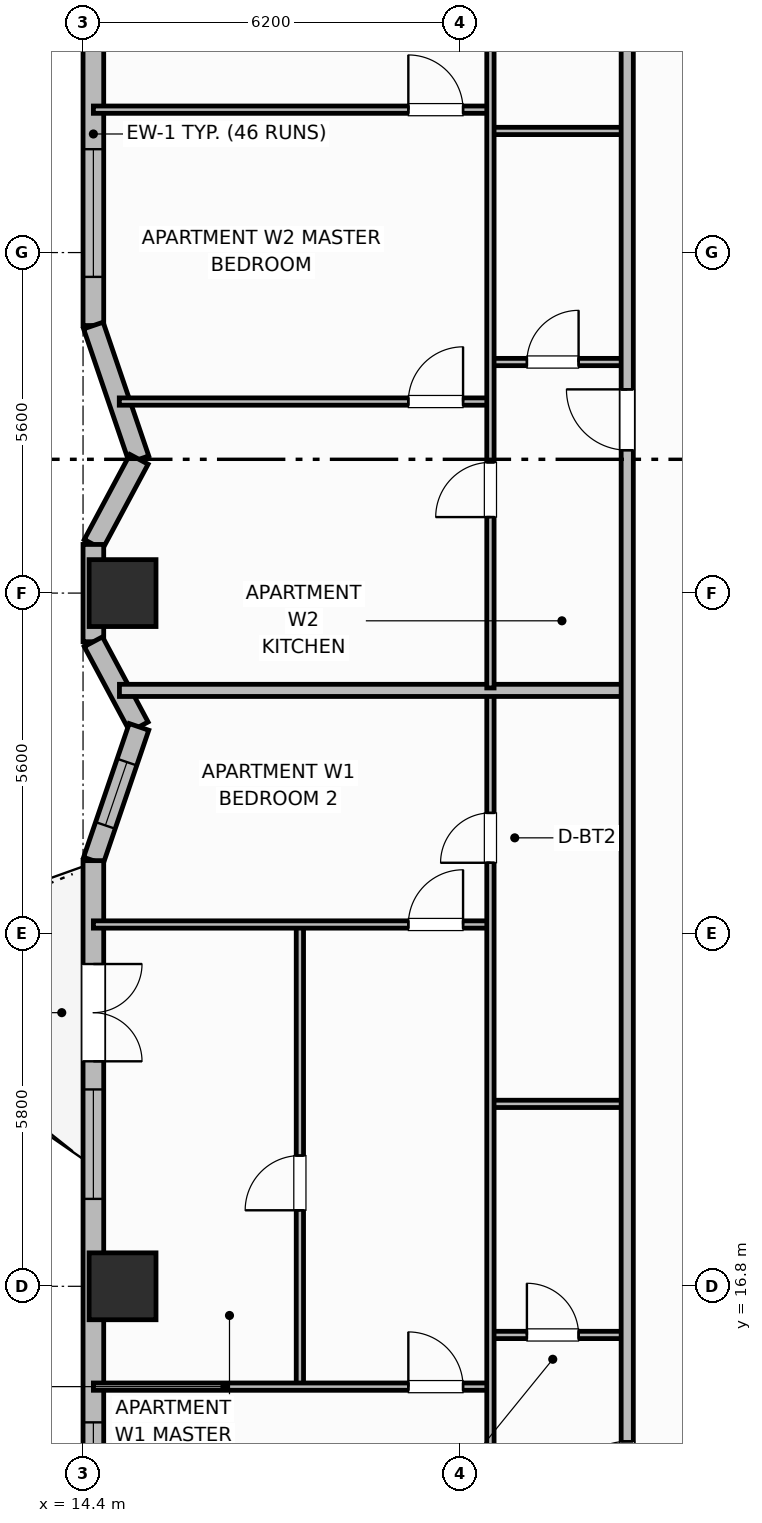
"""IFC4 building model, lengths in metres.
Left out: names, types, materials, properties, quantities, classifications, styles, units other than length and angle.
Written with IfcOpenShell. Run it as: python <this file> out.ifc"""

import sys

from ifc_helpers import new_model, si_unit, direction, frame, frame_2d, origin, origin_2d, place, context, subcontext, project, spatial, rectangle, extrude, element, fill, save


model = new_model("IFC4")
c1 = context("Model", 3, precision=1e-05, world=origin(), true_north=direction((0.0, 1.0)))
c2 = subcontext(c1, "Body", "Model", "MODEL_VIEW")
j1 = project(units=[si_unit("LENGTHUNIT", "METRE"), si_unit("PLANEANGLEUNIT", "RADIAN")], contexts=[c1])
p1 = place(None, origin())
s1 = spatial("IfcSite", under=j1, at=p1, CompositionType="ELEMENT")
p2 = place(p1, origin())
s2 = spatial("IfcBuilding", under=s1, at=p2, CompositionType="ELEMENT")
p3 = place(p2, frame((0.0, 0.0, 121.6)))
s3 = spatial("IfcBuildingStorey", under=s2, at=p3, CompositionType="ELEMENT", Elevation=121.6)
for number, where, z_axis, x_axis in (
    (1, (15.05, 16.8, 0.0), (0.0, 0.0, 1.0), (1.0, 0.0, 0.0)),
    (2, (15.05, 28.2, 0.0), (0.0, 0.0, 1.0), (1.0, 0.0, 0.0)),
):
    element("IfcColumn", number, at=place(p3, frame(where, z_axis=z_axis, x_axis=x_axis)), inside=s3, PredefinedType="COLUMN", context=c2, shape_type="SweptSolid", body=[
        extrude(rectangle(XDim=1.1, YDim=1.1, at=origin_2d()), origin(), (0.0, 0.0, 1.0), 3.7),
    ])
p4 = place(p3, frame((14.57, 47.4, 0.0), z_axis=(0.0, 0.0, 1.0), x_axis=(0.0, -1.0, 0.0)))
e3 = element("IfcWall", 3, at=p4, inside=s3, PredefinedType="SOLIDWALL", context=c2, shape_type="SweptSolid", body=[
    extrude(rectangle(XDim=14.8, YDim=0.34, at=frame_2d((7.4, 0.0))), origin(), (0.0, 0.0, 1.0), 2.7),
])
p5 = place(p4, frame((2.9, 0.0, 0.68)))
e4 = element("IfcOpeningElement", 4, at=p5, cuts=e3, PredefinedType="OPENING", context=c2, shape_type="SweptSolid", body=[
    extrude(rectangle(XDim=2.1, YDim=1.9, at=frame_2d((1.05, 0.95))), frame((0.0, 0.18, 0.0), z_axis=(0.0, -1.0, 0.0), x_axis=(1.0, 0.0, 0.0)), (0.0, 0.0, 1.0), 0.36),
])
p6 = place(p4, frame((8.4, 0.0, 0.69)))
e5 = element("IfcOpeningElement", 5, at=p6, cuts=e3, PredefinedType="OPENING", context=c2, shape_type="SweptSolid", body=[
    extrude(rectangle(XDim=1.4, YDim=1.85, at=frame_2d((0.7, 0.925))), frame((0.0, 0.18, 0.0), z_axis=(0.0, -1.0, 0.0), x_axis=(1.0, 0.0, 0.0)), (0.0, 0.0, 1.0), 0.36),
])
p7 = place(p4, frame((11.9, 0.0, 0.68)))
e6 = element("IfcOpeningElement", 6, at=p7, cuts=e3, PredefinedType="OPENING", context=c2, shape_type="SweptSolid", body=[
    extrude(rectangle(XDim=2.1, YDim=1.9, at=frame_2d((1.05, 0.95))), frame((0.0, 0.18, 0.0), z_axis=(0.0, -1.0, 0.0), x_axis=(1.0, 0.0, 0.0)), (0.0, 0.0, 1.0), 0.36),
])
p8 = place(p3, frame((14.57, 32.6, 0.0), z_axis=(0.0, 0.0, 1.0), x_axis=(0.32264826586, -0.946518936175, 0.0)))
e7 = element("IfcWall", 7, at=p8, inside=s3, PredefinedType="SOLIDWALL", context=c2, shape_type="SweptSolid", body=[
    extrude(rectangle(XDim=2.324, YDim=0.34, at=frame_2d((1.162, 0.0))), origin(), (0.0, 0.0, 1.0), 2.7),
])
p9 = place(p3, frame((15.32, 30.4, 0.0), z_axis=(0.0, 0.0, 1.0), x_axis=(-0.472247007964, -0.881466257703, 0.0)))
e8 = element("IfcWall", 8, at=p9, inside=s3, PredefinedType="SOLIDWALL", context=c2, shape_type="SweptSolid", body=[
    extrude(rectangle(XDim=1.588, YDim=0.34, at=frame_2d((0.794, 0.0))), origin(), (0.0, 0.0, 1.0), 2.7),
])
p10 = place(p3, frame((14.57, 29.0, 0.0), z_axis=(0.0, 0.0, 1.0), x_axis=(0.0, -1.0, 0.0)))
e9 = element("IfcWall", 9, at=p10, inside=s3, PredefinedType="SOLIDWALL", context=c2, shape_type="SweptSolid", body=[
    extrude(rectangle(XDim=1.6, YDim=0.34, at=frame_2d((0.8, 0.0))), origin(), (0.0, 0.0, 1.0), 2.7),
])
p11 = place(p3, frame((14.57, 27.4, 0.0), z_axis=(0.0, 0.0, 1.0), x_axis=(0.472247007964, -0.881466257703, 0.0)))
e10 = element("IfcWall", 10, at=p11, inside=s3, PredefinedType="SOLIDWALL", context=c2, shape_type="SweptSolid", body=[
    extrude(rectangle(XDim=1.588, YDim=0.34, at=frame_2d((0.794, 0.0))), origin(), (0.0, 0.0, 1.0), 2.7),
])
p12 = place(p3, frame((15.32, 26.0, 0.0), z_axis=(0.0, 0.0, 1.0), x_axis=(-0.322680343871, -0.946508000853, 0.0)))
e11 = element("IfcWall", 11, at=p12, inside=s3, PredefinedType="SOLIDWALL", context=c2, shape_type="SweptSolid", body=[
    extrude(rectangle(XDim=2.324, YDim=0.34, at=frame_2d((1.162, 0.0))), origin(), (0.0, 0.0, 1.0), 2.7),
])
p13 = place(p12, frame((0.612, 0.0, 0.89)))
e12 = element("IfcOpeningElement", 12, at=p13, cuts=e11, PredefinedType="OPENING", context=c2, shape_type="SweptSolid", body=[
    extrude(rectangle(XDim=1.1, YDim=1.65, at=frame_2d((0.55, 0.825))), frame((0.0, 0.18, 0.0), z_axis=(0.0, -1.0, 0.0), x_axis=(1.0, 0.0, 0.0)), (0.0, 0.0, 1.0), 0.36),
])
p14 = place(p3, frame((14.57, 23.8, 0.0), z_axis=(0.0, 0.0, 1.0), x_axis=(0.0, -1.0, 0.0)))
e13 = element("IfcWall", 13, at=p14, inside=s3, PredefinedType="SOLIDWALL", context=c2, shape_type="SweptSolid", body=[
    extrude(rectangle(XDim=14.8, YDim=0.34, at=frame_2d((7.4, 0.0))), origin(), (0.0, 0.0, 1.0), 2.7),
])
p15 = place(p14, frame((1.7, 0.0, 0.0)))
e14 = element("IfcOpeningElement", 14, at=p15, cuts=e13, PredefinedType="OPENING", context=c2, shape_type="SweptSolid", body=[
    extrude(rectangle(XDim=1.6, YDim=2.1, at=frame_2d((0.8, 1.05))), frame((0.0, 0.18, 0.0), z_axis=(0.0, -1.0, 0.0), x_axis=(1.0, 0.0, 0.0)), (0.0, 0.0, 1.0), 0.36),
])
p16 = place(p14, frame((3.762, 0.0, 0.73)))
e15 = element("IfcOpeningElement", 15, at=p16, cuts=e13, PredefinedType="OPENING", context=c2, shape_type="SweptSolid", body=[
    extrude(rectangle(XDim=1.8, YDim=1.85, at=frame_2d((0.9, 0.925))), frame((0.0, 0.18, 0.0), z_axis=(0.0, -1.0, 0.0), x_axis=(1.0, 0.0, 0.0)), (0.0, 0.0, 1.0), 0.36),
])
p17 = place(p14, frame((9.238, 0.0, 0.73)))
e16 = element("IfcOpeningElement", 16, at=p17, cuts=e13, PredefinedType="OPENING", context=c2, shape_type="SweptSolid", body=[
    extrude(rectangle(XDim=1.8, YDim=1.85, at=frame_2d((0.9, 0.925))), frame((0.0, 0.18, 0.0), z_axis=(0.0, -1.0, 0.0), x_axis=(1.0, 0.0, 0.0)), (0.0, 0.0, 1.0), 0.36),
])
p18 = place(p3, frame((21.1, 16.0, 0.0), z_axis=(0.0, 0.0, 1.0), x_axis=(1.0, 0.0, 0.0)))
e17 = element("IfcWall", 17, at=p18, inside=s3, PredefinedType="PARTITIONING", context=c2, shape_type="SweptSolid", body=[
    extrude(rectangle(XDim=2.25, YDim=0.12, at=frame_2d((1.125, 0.0))), origin(), (0.0, 0.0, 1.0), 2.53),
])
p19 = place(p18, frame((0.6, 0.0, 0.0)))
e18 = element("IfcOpeningElement", 18, at=p19, cuts=e17, PredefinedType="OPENING", context=c2, shape_type="SweptSolid", body=[
    extrude(rectangle(XDim=0.85, YDim=2.1, at=frame_2d((0.425, 1.05))), frame((0.0, 0.07, 0.0), z_axis=(0.0, -1.0, 0.0), x_axis=(1.0, 0.0, 0.0)), (0.0, 0.0, 1.0), 0.14),
])
p20 = place(p3, frame((21.1, 19.8, 0.0), z_axis=(0.0, 0.0, 1.0), x_axis=(1.0, 0.0, 0.0)))
e19 = element("IfcWall", 19, at=p20, inside=s3, PredefinedType="PARTITIONING", context=c2, shape_type="SweptSolid", body=[
    extrude(rectangle(XDim=2.25, YDim=0.12, at=frame_2d((1.125, 0.0))), origin(), (0.0, 0.0, 1.0), 2.53),
])
p21 = place(p3, frame((17.966, 15.19, 0.0), z_axis=(0.0, 0.0, 1.0), x_axis=(0.0, 1.0, 0.0)))
e20 = element("IfcWall", 20, at=p21, inside=s3, PredefinedType="PARTITIONING", context=c2, shape_type="SweptSolid", body=[
    extrude(rectangle(XDim=7.52, YDim=0.12, at=frame_2d((3.76, 0.0))), origin(), (0.0, 0.0, 1.0), 2.53),
])
p22 = place(p21, frame((2.86, 0.0, 0.0)))
e21 = element("IfcOpeningElement", 21, at=p22, cuts=e20, PredefinedType="OPENING", context=c2, shape_type="SweptSolid", body=[
    extrude(rectangle(XDim=0.9, YDim=2.1, at=frame_2d((0.45, 1.05))), frame((0.0, 0.07, 0.0), z_axis=(0.0, -1.0, 0.0), x_axis=(1.0, 0.0, 0.0)), (0.0, 0.0, 1.0), 0.14),
])
p23 = place(p3, frame((14.57, 15.15, 0.0), z_axis=(0.0, 0.0, 1.0), x_axis=(1.0, 0.0, 0.0)))
e22 = element("IfcWall", 22, at=p23, inside=s3, PredefinedType="PARTITIONING", context=c2, shape_type="SweptSolid", body=[
    extrude(rectangle(XDim=6.53, YDim=0.12, at=frame_2d((3.265, 0.0))), origin(), (0.0, 0.0, 1.0), 2.53),
])
p24 = place(p23, frame((5.18, 0.0, 0.0)))
e23 = element("IfcOpeningElement", 23, at=p24, cuts=e22, PredefinedType="OPENING", context=c2, shape_type="SweptSolid", body=[
    extrude(rectangle(XDim=0.9, YDim=2.1, at=frame_2d((0.45, 1.05))), frame((0.0, 0.07, 0.0), z_axis=(0.0, -1.0, 0.0), x_axis=(1.0, 0.0, 0.0)), (0.0, 0.0, 1.0), 0.14),
])
p25 = place(p3, frame((14.57, 22.75, 0.0), z_axis=(0.0, 0.0, 1.0), x_axis=(1.0, 0.0, 0.0)))
e24 = element("IfcWall", 24, at=p25, inside=s3, PredefinedType="PARTITIONING", context=c2, shape_type="SweptSolid", body=[
    extrude(rectangle(XDim=6.53, YDim=0.12, at=frame_2d((3.265, 0.0))), origin(), (0.0, 0.0, 1.0), 2.53),
])
p26 = place(p25, frame((5.18, 0.0, 0.0)))
e25 = element("IfcOpeningElement", 25, at=p26, cuts=e24, PredefinedType="OPENING", context=c2, shape_type="SweptSolid", body=[
    extrude(rectangle(XDim=0.9, YDim=2.1, at=frame_2d((0.45, 1.05))), frame((0.0, 0.07, 0.0), z_axis=(0.0, -1.0, 0.0), x_axis=(1.0, 0.0, 0.0)), (0.0, 0.0, 1.0), 0.14),
])
p27 = place(p3, frame((21.1, 10.64, 0.0), z_axis=(0.0, 0.0, 1.0), x_axis=(0.0, 1.0, 0.0)))
e26 = element("IfcWall", 26, at=p27, inside=s3, PredefinedType="PARTITIONING", context=c2, shape_type="SweptSolid", body=[
    extrude(rectangle(XDim=15.92, YDim=0.12, at=frame_2d((7.96, 0.0))), origin(), (0.0, 0.0, 1.0), 2.53),
])
p28 = place(p27, frame((0.41, 0.0, 0.0)))
e27 = element("IfcOpeningElement", 27, at=p28, cuts=e26, PredefinedType="OPENING", context=c2, shape_type="SweptSolid", body=[
    extrude(rectangle(XDim=0.9, YDim=2.1, at=frame_2d((0.45, 1.05))), frame((0.0, 0.07, 0.0), z_axis=(0.0, -1.0, 0.0), x_axis=(1.0, 0.0, 0.0)), (0.0, 0.0, 1.0), 0.14),
])
p29 = place(p27, frame((13.125, 0.0, 0.0)))
e28 = element("IfcOpeningElement", 28, at=p29, cuts=e26, PredefinedType="OPENING", context=c2, shape_type="SweptSolid", body=[
    extrude(rectangle(XDim=0.82, YDim=2.08, at=frame_2d((0.41, 1.04))), frame((0.0, 0.07, 0.0), z_axis=(0.0, -1.0, 0.0), x_axis=(1.0, 0.0, 0.0)), (0.0, 0.0, 1.0), 0.14),
])
p30 = place(p3, frame((14.999, 26.6, 0.0), z_axis=(0.0, 0.0, 1.0), x_axis=(1.0, 0.0, 0.0)))
e29 = element("IfcWall", 29, at=p30, inside=s3, PredefinedType="PARTITIONING", context=c2, shape_type="SweptSolid", body=[
    extrude(rectangle(XDim=8.352, YDim=0.2, at=frame_2d((4.176, 0.0))), origin(), (0.0, 0.0, 1.0), 2.53),
])
p31 = place(p3, frame((21.1, 32.0, 0.0), z_axis=(0.0, 0.0, 1.0), x_axis=(1.0, 0.0, 0.0)))
e30 = element("IfcWall", 30, at=p31, inside=s3, PredefinedType="PARTITIONING", context=c2, shape_type="SweptSolid", body=[
    extrude(rectangle(XDim=2.25, YDim=0.12, at=frame_2d((1.125, 0.0))), origin(), (0.0, 0.0, 1.0), 2.53),
])
p32 = place(p31, frame((0.6, 0.0, 0.0)))
e31 = element("IfcOpeningElement", 31, at=p32, cuts=e30, PredefinedType="OPENING", context=c2, shape_type="SweptSolid", body=[
    extrude(rectangle(XDim=0.85, YDim=2.1, at=frame_2d((0.425, 1.05))), frame((0.0, 0.07, 0.0), z_axis=(0.0, -1.0, 0.0), x_axis=(1.0, 0.0, 0.0)), (0.0, 0.0, 1.0), 0.14),
])
p33 = place(p3, frame((21.1, 35.8, 0.0), z_axis=(0.0, 0.0, 1.0), x_axis=(1.0, 0.0, 0.0)))
e32 = element("IfcWall", 32, at=p33, inside=s3, PredefinedType="PARTITIONING", context=c2, shape_type="SweptSolid", body=[
    extrude(rectangle(XDim=2.25, YDim=0.12, at=frame_2d((1.125, 0.0))), origin(), (0.0, 0.0, 1.0), 2.53),
])
p34 = place(p3, frame((14.996, 31.35, 0.0), z_axis=(0.0, 0.0, 1.0), x_axis=(1.0, 0.0, 0.0)))
e33 = element("IfcWall", 33, at=p34, inside=s3, PredefinedType="PARTITIONING", context=c2, shape_type="SweptSolid", body=[
    extrude(rectangle(XDim=6.104, YDim=0.12, at=frame_2d((3.052, 0.0))), origin(), (0.0, 0.0, 1.0), 2.53),
])
p35 = place(p34, frame((4.754, 0.0, 0.0)))
e34 = element("IfcOpeningElement", 34, at=p35, cuts=e33, PredefinedType="OPENING", context=c2, shape_type="SweptSolid", body=[
    extrude(rectangle(XDim=0.9, YDim=2.1, at=frame_2d((0.45, 1.05))), frame((0.0, 0.07, 0.0), z_axis=(0.0, -1.0, 0.0), x_axis=(1.0, 0.0, 0.0)), (0.0, 0.0, 1.0), 0.14),
])
p36 = place(p3, frame((14.57, 36.15, 0.0), z_axis=(0.0, 0.0, 1.0), x_axis=(1.0, 0.0, 0.0)))
e35 = element("IfcWall", 35, at=p36, inside=s3, PredefinedType="PARTITIONING", context=c2, shape_type="SweptSolid", body=[
    extrude(rectangle(XDim=6.53, YDim=0.12, at=frame_2d((3.265, 0.0))), origin(), (0.0, 0.0, 1.0), 2.53),
])
p37 = place(p36, frame((5.18, 0.0, 0.0)))
e36 = element("IfcOpeningElement", 36, at=p37, cuts=e35, PredefinedType="OPENING", context=c2, shape_type="SweptSolid", body=[
    extrude(rectangle(XDim=0.9, YDim=2.1, at=frame_2d((0.45, 1.05))), frame((0.0, 0.07, 0.0), z_axis=(0.0, -1.0, 0.0), x_axis=(1.0, 0.0, 0.0)), (0.0, 0.0, 1.0), 0.14),
])
p38 = place(p3, frame((21.1, 26.64, 0.0), z_axis=(0.0, 0.0, 1.0), x_axis=(0.0, 1.0, 0.0)))
e37 = element("IfcWall", 37, at=p38, inside=s3, PredefinedType="PARTITIONING", context=c2, shape_type="SweptSolid", body=[
    extrude(rectangle(XDim=19.12, YDim=0.12, at=frame_2d((9.56, 0.0))), origin(), (0.0, 0.0, 1.0), 2.53),
])
p39 = place(p38, frame((2.81, 0.0, 0.0)))
e38 = element("IfcOpeningElement", 38, at=p39, cuts=e37, PredefinedType="OPENING", context=c2, shape_type="SweptSolid", body=[
    extrude(rectangle(XDim=0.9, YDim=2.1, at=frame_2d((0.45, 1.05))), frame((0.0, 0.07, 0.0), z_axis=(0.0, -1.0, 0.0), x_axis=(1.0, 0.0, 0.0)), (0.0, 0.0, 1.0), 0.14),
])
p40 = place(p38, frame((16.18, 0.0, 0.0)))
e39 = element("IfcOpeningElement", 39, at=p40, cuts=e37, PredefinedType="OPENING", context=c2, shape_type="SweptSolid", body=[
    extrude(rectangle(XDim=0.82, YDim=2.08, at=frame_2d((0.41, 1.04))), frame((0.0, 0.07, 0.0), z_axis=(0.0, -1.0, 0.0), x_axis=(1.0, 0.0, 0.0)), (0.0, 0.0, 1.0), 0.14),
])
p41 = place(p3, frame((23.35, 10.6, 0.0), z_axis=(0.0, 0.0, 1.0), x_axis=(0.0, 1.0, 0.0)))
e40 = element("IfcWall", 40, at=p41, inside=s3, PredefinedType="PARTITIONING", context=c2, shape_type="SweptSolid", body=[
    extrude(rectangle(XDim=35.2, YDim=0.2, at=frame_2d((17.6, 0.0))), origin(), (0.0, 0.0, 1.0), 2.53),
])
p42 = place(p41, frame((2.65, 0.0, 0.0)))
e41 = element("IfcOpeningElement", 41, at=p42, cuts=e40, PredefinedType="OPENING", context=c2, shape_type="SweptSolid", body=[
    extrude(rectangle(XDim=1.0, YDim=2.15, at=frame_2d((0.5, 1.075))), frame((0.0, 0.11, 0.0), z_axis=(0.0, -1.0, 0.0), x_axis=(1.0, 0.0, 0.0)), (0.0, 0.0, 1.0), 0.22),
])
p43 = place(p41, frame((19.95, 0.0, 0.0)))
e42 = element("IfcOpeningElement", 42, at=p43, cuts=e40, PredefinedType="OPENING", context=c2, shape_type="SweptSolid", body=[
    extrude(rectangle(XDim=1.0, YDim=2.15, at=frame_2d((0.5, 1.075))), frame((0.0, 0.11, 0.0), z_axis=(0.0, -1.0, 0.0), x_axis=(1.0, 0.0, 0.0)), (0.0, 0.0, 1.0), 0.22),
])
p44 = place(p7, origin())
e43 = element("IfcWindow", 43, at=p44, inside=s3, PartitioningType="SINGLE_PANEL", PredefinedType="WINDOW", context=c2, shape_type="SweptSolid", body=[
    extrude(rectangle(XDim=2.1, YDim=1.9, at=frame_2d((1.05, 0.95))), frame((0.0, 0.03, 0.0), z_axis=(0.0, -1.0, 0.0), x_axis=(1.0, 0.0, 0.0)), (0.0, 0.0, 1.0), 0.06),
])
fill(e6, e43)
p45 = place(p13, origin())
e44 = element("IfcWindow", 44, at=p45, inside=s3, PartitioningType="SINGLE_PANEL", PredefinedType="WINDOW", context=c2, shape_type="SweptSolid", body=[
    extrude(rectangle(XDim=1.1, YDim=1.65, at=frame_2d((0.55, 0.825))), frame((0.0, 0.03, 0.0), z_axis=(0.0, -1.0, 0.0), x_axis=(1.0, 0.0, 0.0)), (0.0, 0.0, 1.0), 0.06),
])
fill(e12, e44)
p46 = place(p15, origin())
e45 = element("IfcDoor", 45, at=p46, inside=s3, OperationType="DOUBLE_DOOR_SINGLE_SWING", PredefinedType="DOOR", context=c2, shape_type="SweptSolid", body=[
    extrude(rectangle(XDim=1.6, YDim=2.1, at=frame_2d((0.8, 1.05))), frame((0.0, 0.025, 0.0), z_axis=(0.0, -1.0, 0.0), x_axis=(1.0, 0.0, 0.0)), (0.0, 0.0, 1.0), 0.05),
])
fill(e14, e45)
p47 = place(p16, origin())
e46 = element("IfcWindow", 46, at=p47, inside=s3, PartitioningType="SINGLE_PANEL", PredefinedType="WINDOW", context=c2, shape_type="SweptSolid", body=[
    extrude(rectangle(XDim=1.8, YDim=1.85, at=frame_2d((0.9, 0.925))), frame((0.0, 0.03, 0.0), z_axis=(0.0, -1.0, 0.0), x_axis=(1.0, 0.0, 0.0)), (0.0, 0.0, 1.0), 0.06),
])
fill(e15, e46)
p48 = place(p17, origin())
e47 = element("IfcWindow", 47, at=p48, inside=s3, PartitioningType="SINGLE_PANEL", PredefinedType="WINDOW", context=c2, shape_type="SweptSolid", body=[
    extrude(rectangle(XDim=1.8, YDim=1.85, at=frame_2d((0.9, 0.925))), frame((0.0, 0.03, 0.0), z_axis=(0.0, -1.0, 0.0), x_axis=(1.0, 0.0, 0.0)), (0.0, 0.0, 1.0), 0.06),
])
fill(e16, e47)
p49 = place(p19, origin())
e48 = element("IfcDoor", 48, at=p49, inside=s3, OperationType="SINGLE_SWING_LEFT", PredefinedType="DOOR", context=c2, shape_type="SweptSolid", body=[
    extrude(rectangle(XDim=0.85, YDim=2.1, at=frame_2d((0.425, 1.05))), frame((0.0, 0.025, 0.0), z_axis=(0.0, -1.0, 0.0), x_axis=(1.0, 0.0, 0.0)), (0.0, 0.0, 1.0), 0.05),
])
fill(e18, e48)
p50 = place(p22, origin())
e49 = element("IfcDoor", 49, at=p50, inside=s3, OperationType="SINGLE_SWING_LEFT", PredefinedType="DOOR", context=c2, shape_type="SweptSolid", body=[
    extrude(rectangle(XDim=0.9, YDim=2.1, at=frame_2d((0.45, 1.05))), frame((0.0, 0.025, 0.0), z_axis=(0.0, -1.0, 0.0), x_axis=(1.0, 0.0, 0.0)), (0.0, 0.0, 1.0), 0.05),
])
fill(e21, e49)
p51 = place(p24, origin())
e50 = element("IfcDoor", 50, at=p51, inside=s3, OperationType="SINGLE_SWING_LEFT", PredefinedType="DOOR", context=c2, shape_type="SweptSolid", body=[
    extrude(rectangle(XDim=0.9, YDim=2.1, at=frame_2d((0.45, 1.05))), frame((0.0, 0.025, 0.0), z_axis=(0.0, -1.0, 0.0), x_axis=(1.0, 0.0, 0.0)), (0.0, 0.0, 1.0), 0.05),
])
fill(e23, e50)
p52 = place(p26, origin())
e51 = element("IfcDoor", 51, at=p52, inside=s3, OperationType="SINGLE_SWING_RIGHT", PredefinedType="DOOR", context=c2, shape_type="SweptSolid", body=[
    extrude(rectangle(XDim=0.9, YDim=2.1, at=frame_2d((0.45, 1.05))), frame((0.0, 0.025, 0.0), z_axis=(0.0, -1.0, 0.0), x_axis=(1.0, 0.0, 0.0)), (0.0, 0.0, 1.0), 0.05),
])
fill(e25, e51)
p53 = place(p29, origin())
e52 = element("IfcDoor", 52, at=p53, inside=s3, OperationType="SINGLE_SWING_LEFT", PredefinedType="DOOR", context=c2, shape_type="SweptSolid", body=[
    extrude(rectangle(XDim=0.82, YDim=2.08, at=frame_2d((0.41, 1.04))), frame((0.0, 0.025, 0.0), z_axis=(0.0, -1.0, 0.0), x_axis=(1.0, 0.0, 0.0)), (0.0, 0.0, 1.0), 0.05),
])
fill(e28, e52)
p54 = place(p32, origin())
e53 = element("IfcDoor", 53, at=p54, inside=s3, OperationType="SINGLE_SWING_RIGHT", PredefinedType="DOOR", context=c2, shape_type="SweptSolid", body=[
    extrude(rectangle(XDim=0.85, YDim=2.1, at=frame_2d((0.425, 1.05))), frame((0.0, 0.025, 0.0), z_axis=(0.0, -1.0, 0.0), x_axis=(1.0, 0.0, 0.0)), (0.0, 0.0, 1.0), 0.05),
])
fill(e31, e53)
p55 = place(p35, origin())
e54 = element("IfcDoor", 54, at=p55, inside=s3, OperationType="SINGLE_SWING_RIGHT", PredefinedType="DOOR", context=c2, shape_type="SweptSolid", body=[
    extrude(rectangle(XDim=0.9, YDim=2.1, at=frame_2d((0.45, 1.05))), frame((0.0, 0.025, 0.0), z_axis=(0.0, -1.0, 0.0), x_axis=(1.0, 0.0, 0.0)), (0.0, 0.0, 1.0), 0.05),
])
fill(e34, e54)
p56 = place(p37, origin())
e55 = element("IfcDoor", 55, at=p56, inside=s3, OperationType="SINGLE_SWING_LEFT", PredefinedType="DOOR", context=c2, shape_type="SweptSolid", body=[
    extrude(rectangle(XDim=0.9, YDim=2.1, at=frame_2d((0.45, 1.05))), frame((0.0, 0.025, 0.0), z_axis=(0.0, -1.0, 0.0), x_axis=(1.0, 0.0, 0.0)), (0.0, 0.0, 1.0), 0.05),
])
fill(e36, e55)
p57 = place(p39, origin())
e56 = element("IfcDoor", 56, at=p57, inside=s3, OperationType="SINGLE_SWING_LEFT", PredefinedType="DOOR", context=c2, shape_type="SweptSolid", body=[
    extrude(rectangle(XDim=0.9, YDim=2.1, at=frame_2d((0.45, 1.05))), frame((0.0, 0.025, 0.0), z_axis=(0.0, -1.0, 0.0), x_axis=(1.0, 0.0, 0.0)), (0.0, 0.0, 1.0), 0.05),
])
fill(e38, e56)
p58 = place(p42, origin())
e57 = element("IfcDoor", 57, at=p58, inside=s3, OperationType="SINGLE_SWING_LEFT", PredefinedType="DOOR", context=c2, shape_type="SweptSolid", body=[
    extrude(rectangle(XDim=1.0, YDim=2.15, at=frame_2d((0.5, 1.075))), frame((0.0, 0.025, 0.0), z_axis=(0.0, -1.0, 0.0), x_axis=(1.0, 0.0, 0.0)), (0.0, 0.0, 1.0), 0.05),
])
fill(e41, e57)
p59 = place(p43, origin())
e58 = element("IfcDoor", 58, at=p59, inside=s3, OperationType="SINGLE_SWING_RIGHT", PredefinedType="DOOR", context=c2, shape_type="SweptSolid", body=[
    extrude(rectangle(XDim=1.0, YDim=2.15, at=frame_2d((0.5, 1.075))), frame((0.0, 0.025, 0.0), z_axis=(0.0, -1.0, 0.0), x_axis=(1.0, 0.0, 0.0)), (0.0, 0.0, 1.0), 0.05),
])
fill(e42, e58)
save(model, sys.argv[1])
